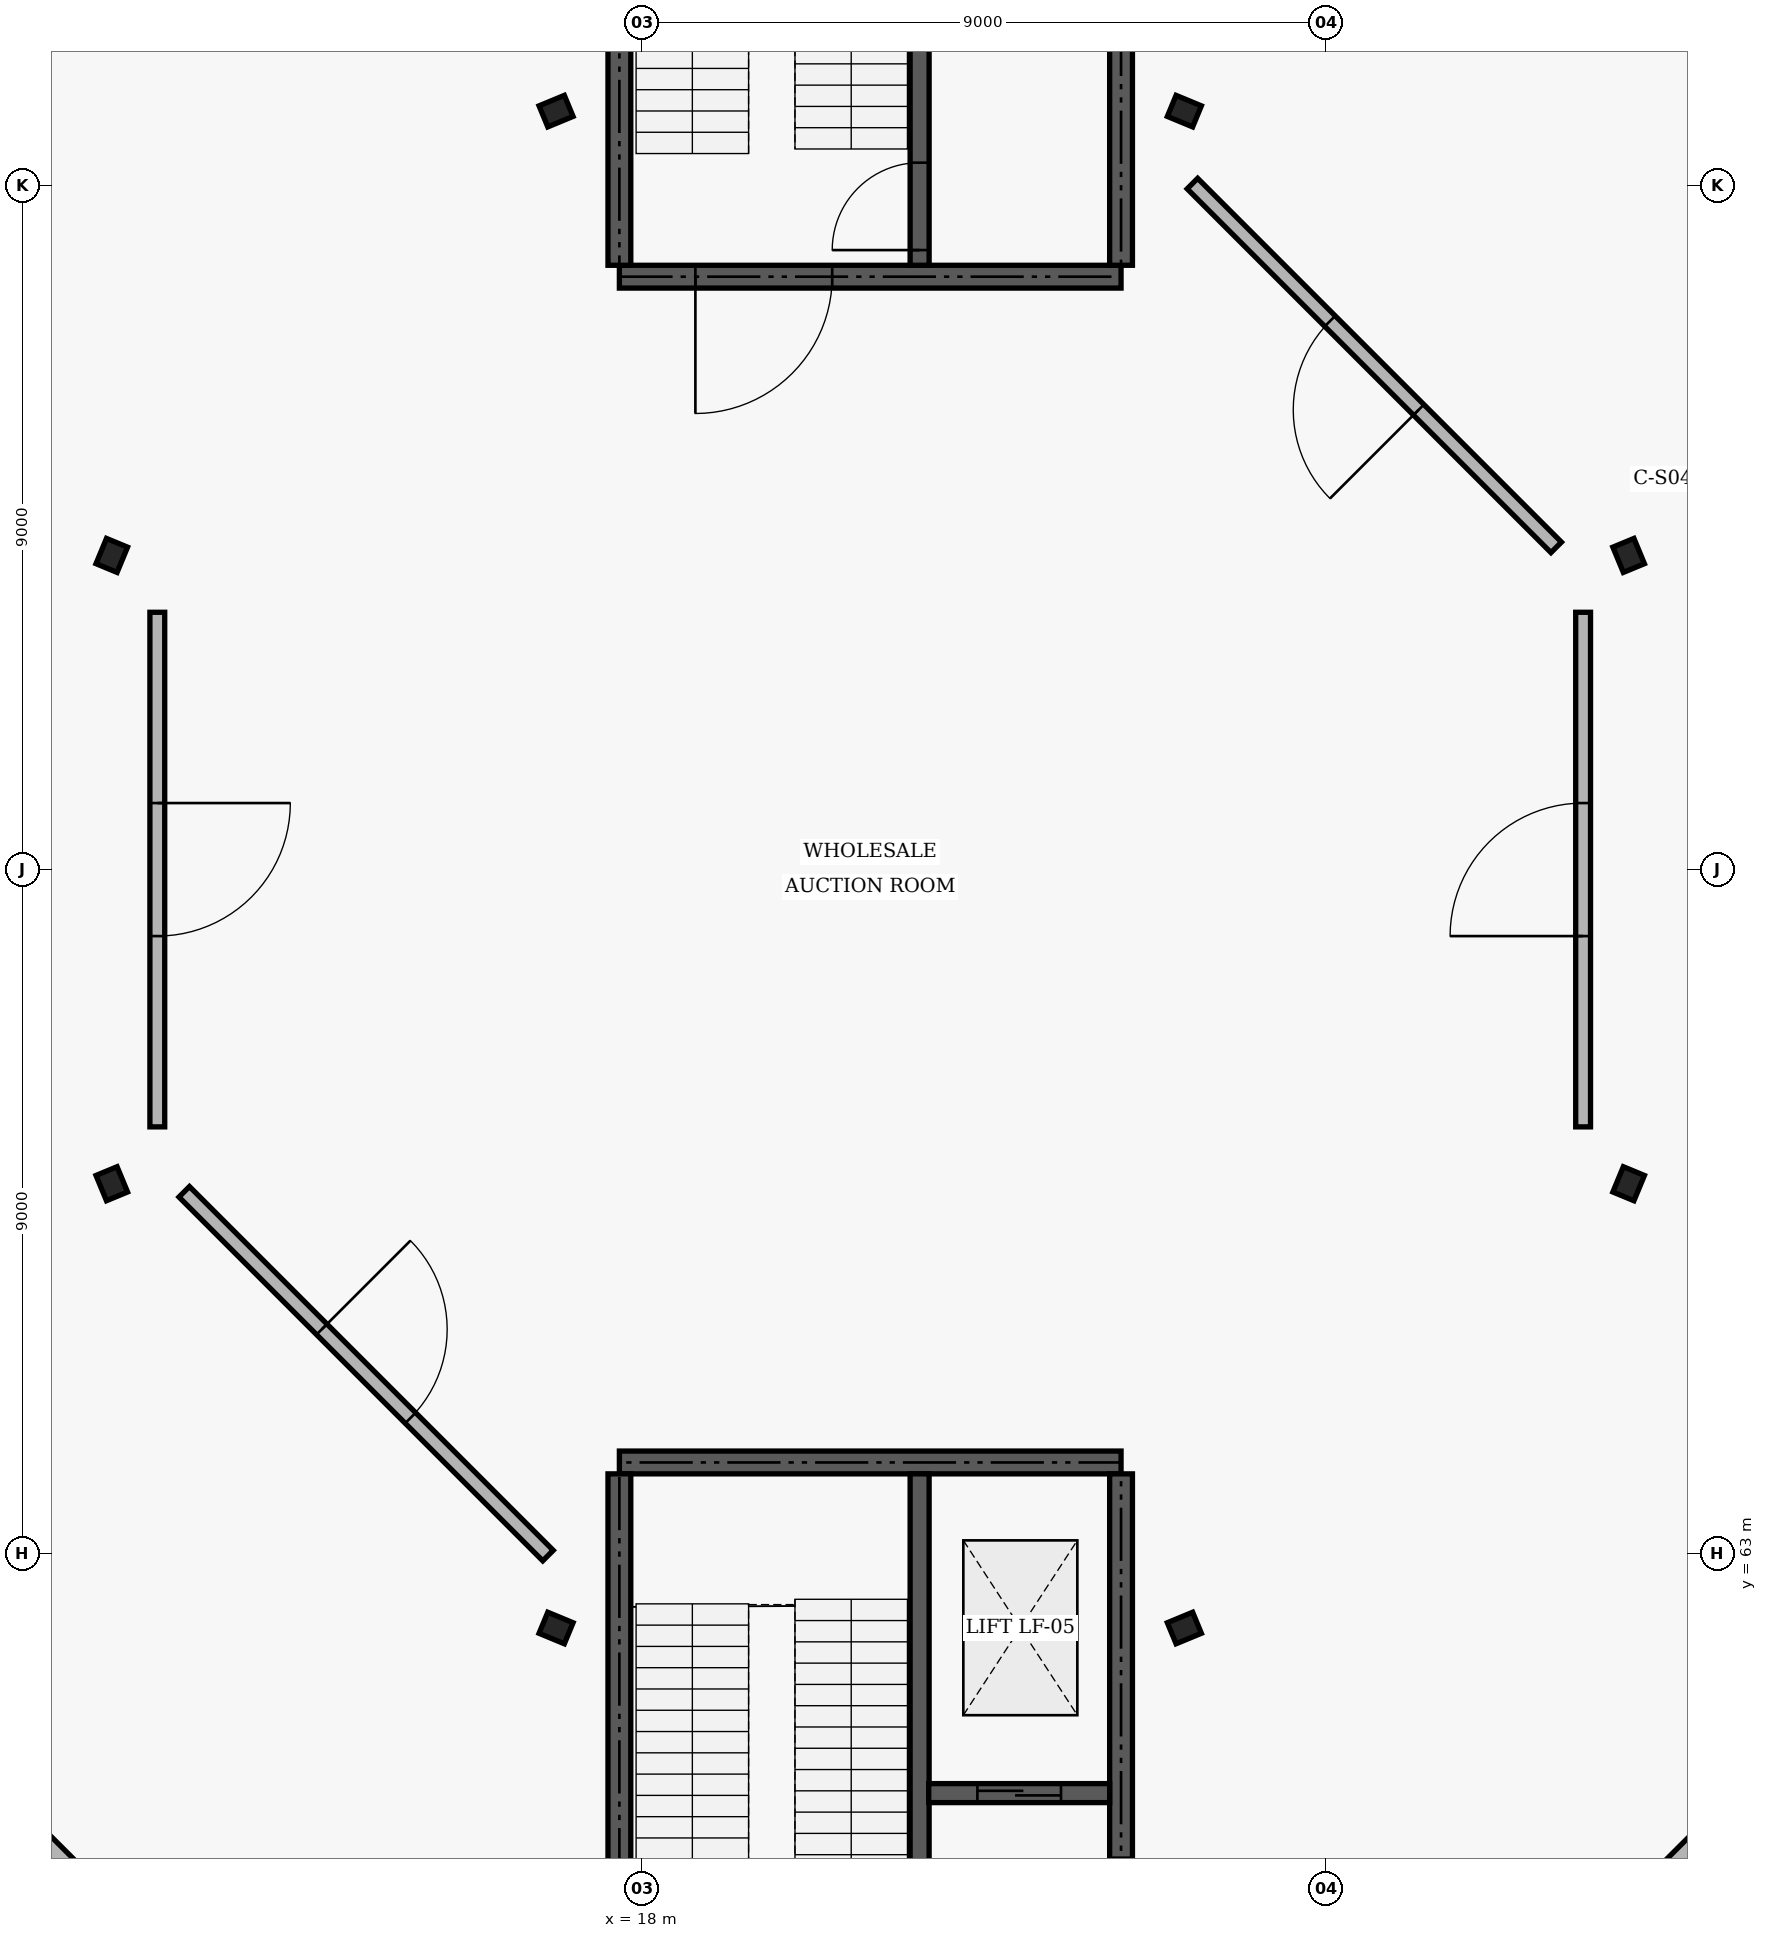
"""IFC4 building model, lengths in metres.
Left out: names, types, materials, properties, quantities, classifications, styles, units other than length and angle.
Written with IfcOpenShell. Run it as: python <this file> out.ifc"""

import sys

from ifc_helpers import new_model, si_unit, direction, frame, frame_2d, origin, origin_2d, place, context, subcontext, project, spatial, rectangle, i_section, extrude, element, fill, save


model = new_model("IFC4")
c1 = context("Model", 3, precision=1e-05, world=origin(), true_north=direction((0.0, 1.0)))
c2 = subcontext(c1, "Body", "Model", "MODEL_VIEW")
j1 = project(units=[si_unit("LENGTHUNIT", "METRE"), si_unit("PLANEANGLEUNIT", "RADIAN")], contexts=[c1])
p1 = place(None, origin())
s1 = spatial("IfcSite", under=j1, at=p1, CompositionType="ELEMENT")
p2 = place(p1, origin())
s2 = spatial("IfcBuilding", under=s1, at=p2, CompositionType="ELEMENT")
p3 = place(p2, origin())
s3 = spatial("IfcBuildingStorey", under=s2, at=p3, CompositionType="ELEMENT", Elevation=0.0)
for number, where, z_axis, x_axis in (
    (1, (30.978, 76.133, 0.0), (0.0, 0.0, 1.0), (0.924, 0.383, 0.0)),
    (2, (25.133, 81.978, 0.0), (0.0, 0.0, 1.0), (0.383, 0.924, 0.0)),
    (3, (16.867, 81.978, 0.0), (0.0, 0.0, 1.0), (-0.383, 0.924, 0.0)),
    (4, (11.022, 76.133, 0.0), (0.0, 0.0, 1.0), (-0.924, 0.383, 0.0)),
    (5, (11.022, 67.867, 0.0), (0.0, 0.0, 1.0), (-0.924, -0.383, 0.0)),
    (6, (16.867, 62.022, 0.0), (0.0, 0.0, 1.0), (-0.383, -0.924, 0.0)),
    (7, (25.133, 62.022, 0.0), (0.0, 0.0, 1.0), (0.383, -0.924, 0.0)),
    (8, (30.978, 67.867, 0.0), (0.0, 0.0, 1.0), (0.924, -0.383, 0.0)),
):
    element("IfcColumn", number, at=place(p3, frame(where, z_axis=z_axis, x_axis=x_axis)), inside=s3, PredefinedType="COLUMN", context=c2, shape_type="SweptSolid", body=[
        extrude(i_section(OverallWidth=0.3, OverallDepth=0.36, WebThickness=0.012, FlangeThickness=0.022, FilletRadius=0.027, at=origin_2d()), origin(), (0.0, 0.0, 1.0), 5.4),
    ])
p4 = place(p3, frame((37.716, 79.064, 0.0), z_axis=(0.0, 0.0, 1.0), x_axis=(-0.707106781187, 0.707106781187, 0.0)))
e9 = element("IfcWall", 9, at=p4, inside=s3, PredefinedType="SOLIDWALL", context=c2, shape_type="SweptSolid", body=[
    extrude(rectangle(XDim=13.65, YDim=0.4, at=frame_2d((6.825, 0.0))), origin(), (0.0, 0.0, 1.0), 4.35),
])
p5 = place(p4, frame((5.825, 0.0, 0.0)))
e10 = element("IfcOpeningElement", 10, at=p5, cuts=e9, PredefinedType="OPENING", context=c2, shape_type="SweptSolid", body=[
    extrude(rectangle(XDim=2.0, YDim=2.3, at=frame_2d((1.0, 1.15))), frame((0.0, 0.21, 0.0), z_axis=(0.0, -1.0, 0.0), x_axis=(1.0, 0.0, 0.0)), (0.0, 0.0, 1.0), 0.42),
])
p6 = place(p3, frame((13.936, 88.716, 0.0), z_axis=(0.0, 0.0, 1.0), x_axis=(-0.707106781187, -0.707106781187, 0.0)))
e11 = element("IfcWall", 11, at=p6, inside=s3, PredefinedType="SOLIDWALL", context=c2, shape_type="SweptSolid", body=[
    extrude(rectangle(XDim=13.65, YDim=0.4, at=frame_2d((6.825, 0.0))), origin(), (0.0, 0.0, 1.0), 4.35),
])
p7 = place(p6, frame((5.825, 0.0, 0.0)))
e12 = element("IfcOpeningElement", 12, at=p7, cuts=e11, PredefinedType="OPENING", context=c2, shape_type="SweptSolid", body=[
    extrude(rectangle(XDim=2.0, YDim=2.3, at=frame_2d((1.0, 1.15))), frame((0.0, 0.21, 0.0), z_axis=(0.0, -1.0, 0.0), x_axis=(1.0, 0.0, 0.0)), (0.0, 0.0, 1.0), 0.42),
])
p8 = place(p3, frame((4.284, 64.936, 0.0), z_axis=(0.0, 0.0, 1.0), x_axis=(0.707106781187, -0.707106781187, 0.0)))
e13 = element("IfcWall", 13, at=p8, inside=s3, PredefinedType="SOLIDWALL", context=c2, shape_type="SweptSolid", body=[
    extrude(rectangle(XDim=13.65, YDim=0.4, at=frame_2d((6.825, 0.0))), origin(), (0.0, 0.0, 1.0), 4.35),
])
p9 = place(p8, frame((5.825, 0.0, 0.0)))
e14 = element("IfcOpeningElement", 14, at=p9, cuts=e13, PredefinedType="OPENING", context=c2, shape_type="SweptSolid", body=[
    extrude(rectangle(XDim=2.0, YDim=2.3, at=frame_2d((1.0, 1.15))), frame((0.0, 0.21, 0.0), z_axis=(0.0, -1.0, 0.0), x_axis=(1.0, 0.0, 0.0)), (0.0, 0.0, 1.0), 0.42),
])
p10 = place(p3, frame((28.064, 55.284, 0.0), z_axis=(0.0, 0.0, 1.0), x_axis=(0.707106781187, 0.707106781187, 0.0)))
e15 = element("IfcWall", 15, at=p10, inside=s3, PredefinedType="SOLIDWALL", context=c2, shape_type="SweptSolid", body=[
    extrude(rectangle(XDim=13.65, YDim=0.4, at=frame_2d((6.825, 0.0))), origin(), (0.0, 0.0, 1.0), 4.35),
])
p11 = place(p10, frame((5.825, 0.0, 0.0)))
e16 = element("IfcOpeningElement", 16, at=p11, cuts=e15, PredefinedType="OPENING", context=c2, shape_type="SweptSolid", body=[
    extrude(rectangle(XDim=2.0, YDim=2.3, at=frame_2d((1.0, 1.15))), frame((0.0, 0.21, 0.0), z_axis=(0.0, -1.0, 0.0), x_axis=(1.0, 0.0, 0.0)), (0.0, 0.0, 1.0), 0.42),
])
p12 = place(p3, frame((17.7, 64.2, 0.0), z_axis=(0.0, 0.0, 1.0), x_axis=(1.0, 0.0, 0.0)))
e17 = element("IfcWall", 17, at=p12, inside=s3, PredefinedType="SHEAR", context=c2, shape_type="SweptSolid", body=[
    extrude(rectangle(XDim=6.6, YDim=0.3, at=frame_2d((3.3, 0.0))), origin(), (0.0, 0.0, 1.0), 5.4),
])
p13 = place(p3, frame((17.7, 56.95, 0.0), z_axis=(0.0, 0.0, 1.0), x_axis=(0.0, 1.0, 0.0)))
e18 = element("IfcWall", 18, at=p13, inside=s3, PredefinedType="SHEAR", context=c2, shape_type="SweptSolid", body=[
    extrude(rectangle(XDim=7.1, YDim=0.3, at=frame_2d((3.55, 0.0))), origin(), (0.0, 0.0, 1.0), 5.4),
])
p14 = place(p3, frame((24.3, 56.95, 0.0), z_axis=(0.0, 0.0, 1.0), x_axis=(0.0, 1.0, 0.0)))
e19 = element("IfcWall", 19, at=p14, inside=s3, PredefinedType="SHEAR", context=c2, shape_type="SweptSolid", body=[
    extrude(rectangle(XDim=7.1, YDim=0.3, at=frame_2d((3.55, 0.0))), origin(), (0.0, 0.0, 1.0), 5.4),
])
p15 = place(p14, frame((0.75, 0.0, 0.0)))
e20 = element("IfcOpeningElement", 20, at=p15, cuts=e19, PredefinedType="OPENING", context=c2, shape_type="SweptSolid", body=[
    extrude(rectangle(XDim=1.3, YDim=2.15, at=frame_2d((0.65, 1.075))), frame((0.0, 0.16, 0.0), z_axis=(0.0, -1.0, 0.0), x_axis=(1.0, 0.0, 0.0)), (0.0, 0.0, 1.0), 0.32),
])
p16 = place(p3, frame((21.65, 56.95, 0.0), z_axis=(0.0, 0.0, 1.0), x_axis=(0.0, 1.0, 0.0)))
e21 = element("IfcWall", 21, at=p16, inside=s3, PredefinedType="SHEAR", context=c2, shape_type="SweptSolid", body=[
    extrude(rectangle(XDim=7.1, YDim=0.25, at=frame_2d((3.55, 0.0))), origin(), (0.0, 0.0, 1.0), 5.4),
])
p17 = place(p16, frame((0.2, 0.0, 0.0)))
e22 = element("IfcOpeningElement", 22, at=p17, cuts=e21, PredefinedType="OPENING", context=c2, shape_type="SweptSolid", body=[
    extrude(rectangle(XDim=1.15, YDim=2.15, at=frame_2d((0.575, 1.075))), frame((0.0, 0.135, 0.0), z_axis=(0.0, -1.0, 0.0), x_axis=(1.0, 0.0, 0.0)), (0.0, 0.0, 1.0), 0.27),
])
p18 = place(p3, frame((21.77, 59.85, 0.0), z_axis=(0.0, 0.0, 1.0), x_axis=(1.0, 0.0, 0.0)))
e23 = element("IfcWall", 23, at=p18, inside=s3, PredefinedType="SHEAR", context=c2, shape_type="SweptSolid", body=[
    extrude(rectangle(XDim=2.38, YDim=0.25, at=frame_2d((1.19, 0.0))), origin(), (0.0, 0.0, 1.0), 5.4),
])
p19 = place(p18, frame((0.64, 0.0, 0.0)))
e24 = element("IfcOpeningElement", 24, at=p19, cuts=e23, PredefinedType="OPENING", context=c2, shape_type="SweptSolid", body=[
    extrude(rectangle(XDim=1.1, YDim=2.15, at=frame_2d((0.55, 1.075))), frame((0.0, 0.135, 0.0), z_axis=(0.0, -1.0, 0.0), x_axis=(1.0, 0.0, 0.0)), (0.0, 0.0, 1.0), 0.27),
])
p20 = place(p3, frame((17.7, 79.8, 0.0), z_axis=(0.0, 0.0, 1.0), x_axis=(1.0, 0.0, 0.0)))
e25 = element("IfcWall", 25, at=p20, inside=s3, PredefinedType="SHEAR", context=c2, shape_type="SweptSolid", body=[
    extrude(rectangle(XDim=6.6, YDim=0.3, at=frame_2d((3.3, 0.0))), origin(), (0.0, 0.0, 1.0), 5.4),
])
p21 = place(p20, frame((1.0, 0.0, 0.0)))
e26 = element("IfcOpeningElement", 26, at=p21, cuts=e25, PredefinedType="OPENING", context=c2, shape_type="SweptSolid", body=[
    extrude(rectangle(XDim=1.8, YDim=2.15, at=frame_2d((0.9, 1.075))), frame((0.0, 0.16, 0.0), z_axis=(0.0, -1.0, 0.0), x_axis=(1.0, 0.0, 0.0)), (0.0, 0.0, 1.0), 0.32),
])
p22 = place(p3, frame((17.7, 79.95, 0.0), z_axis=(0.0, 0.0, 1.0), x_axis=(0.0, 1.0, 0.0)))
e27 = element("IfcWall", 27, at=p22, inside=s3, PredefinedType="SHEAR", context=c2, shape_type="SweptSolid", body=[
    extrude(rectangle(XDim=7.1, YDim=0.3, at=frame_2d((3.55, 0.0))), origin(), (0.0, 0.0, 1.0), 5.4),
])
p23 = place(p3, frame((24.3, 79.95, 0.0), z_axis=(0.0, 0.0, 1.0), x_axis=(0.0, 1.0, 0.0)))
e28 = element("IfcWall", 28, at=p23, inside=s3, PredefinedType="SHEAR", context=c2, shape_type="SweptSolid", body=[
    extrude(rectangle(XDim=7.1, YDim=0.3, at=frame_2d((3.55, 0.0))), origin(), (0.0, 0.0, 1.0), 5.4),
])
p24 = place(p23, frame((4.2, 0.0, 0.0)))
e29 = element("IfcOpeningElement", 29, at=p24, cuts=e28, PredefinedType="OPENING", context=c2, shape_type="SweptSolid", body=[
    extrude(rectangle(XDim=1.3, YDim=2.15, at=frame_2d((0.65, 1.075))), frame((0.0, 0.16, 0.0), z_axis=(0.0, -1.0, 0.0), x_axis=(1.0, 0.0, 0.0)), (0.0, 0.0, 1.0), 0.32),
])
p25 = place(p3, frame((21.65, 79.95, 0.0), z_axis=(0.0, 0.0, 1.0), x_axis=(0.0, 1.0, 0.0)))
e30 = element("IfcWall", 30, at=p25, inside=s3, PredefinedType="SHEAR", context=c2, shape_type="SweptSolid", body=[
    extrude(rectangle(XDim=7.1, YDim=0.25, at=frame_2d((3.55, 0.0))), origin(), (0.0, 0.0, 1.0), 5.4),
])
p26 = place(p25, frame((0.2, 0.0, 0.0)))
e31 = element("IfcOpeningElement", 31, at=p26, cuts=e30, PredefinedType="OPENING", context=c2, shape_type="SweptSolid", body=[
    extrude(rectangle(XDim=1.15, YDim=2.15, at=frame_2d((0.575, 1.075))), frame((0.0, 0.135, 0.0), z_axis=(0.0, -1.0, 0.0), x_axis=(1.0, 0.0, 0.0)), (0.0, 0.0, 1.0), 0.27),
])
p27 = place(p3, frame((30.025, 76.239, 0.0), z_axis=(0.0, 0.0, 1.0), x_axis=(-0.707106781187, 0.707106781187, 0.0)))
e32 = element("IfcWall", 32, at=p27, inside=s3, PredefinedType="PARTITIONING", context=c2, shape_type="SweptSolid", body=[
    extrude(rectangle(XDim=6.768, YDim=0.195, at=frame_2d((3.384, 0.0))), origin(), (0.0, 0.0, 1.0), 4.3),
])
p28 = place(p27, frame((2.559, 0.0, 0.0)))
e33 = element("IfcOpeningElement", 33, at=p28, cuts=e32, PredefinedType="OPENING", context=c2, shape_type="SweptSolid", body=[
    extrude(rectangle(XDim=1.65, YDim=2.25, at=frame_2d((0.825, 1.125))), frame((0.0, 0.107, 0.0), z_axis=(0.0, -1.0, 0.0), x_axis=(1.0, 0.0, 0.0)), (0.0, 0.0, 1.0), 0.215),
])
p29 = place(p3, frame((11.621, 75.385, 0.0), z_axis=(0.0, 0.0, 1.0), x_axis=(0.0, -1.0, 0.0)))
e34 = element("IfcWall", 34, at=p29, inside=s3, PredefinedType="PARTITIONING", context=c2, shape_type="SweptSolid", body=[
    extrude(rectangle(XDim=6.77, YDim=0.195, at=frame_2d((3.385, 0.0))), origin(), (0.0, 0.0, 1.0), 4.3),
])
p30 = place(p29, frame((2.51, 0.0, 0.0)))
e35 = element("IfcOpeningElement", 35, at=p30, cuts=e34, PredefinedType="OPENING", context=c2, shape_type="SweptSolid", body=[
    extrude(rectangle(XDim=1.75, YDim=2.3, at=frame_2d((0.875, 1.15))), frame((0.0, 0.107, 0.0), z_axis=(0.0, -1.0, 0.0), x_axis=(1.0, 0.0, 0.0)), (0.0, 0.0, 1.0), 0.215),
])
p31 = place(p3, frame((11.975, 67.761, 0.0), z_axis=(0.0, 0.0, 1.0), x_axis=(0.707106781187, -0.707106781187, 0.0)))
e36 = element("IfcWall", 36, at=p31, inside=s3, PredefinedType="PARTITIONING", context=c2, shape_type="SweptSolid", body=[
    extrude(rectangle(XDim=6.768, YDim=0.195, at=frame_2d((3.384, 0.0))), origin(), (0.0, 0.0, 1.0), 4.3),
])
p32 = place(p31, frame((2.559, 0.0, 0.0)))
e37 = element("IfcOpeningElement", 37, at=p32, cuts=e36, PredefinedType="OPENING", context=c2, shape_type="SweptSolid", body=[
    extrude(rectangle(XDim=1.65, YDim=2.25, at=frame_2d((0.825, 1.125))), frame((0.0, 0.107, 0.0), z_axis=(0.0, -1.0, 0.0), x_axis=(1.0, 0.0, 0.0)), (0.0, 0.0, 1.0), 0.215),
])
p33 = place(p3, frame((30.379, 68.615, 0.0), z_axis=(0.0, 0.0, 1.0), x_axis=(0.0, 1.0, 0.0)))
e38 = element("IfcWall", 38, at=p33, inside=s3, PredefinedType="PARTITIONING", context=c2, shape_type="SweptSolid", body=[
    extrude(rectangle(XDim=6.77, YDim=0.195, at=frame_2d((3.385, 0.0))), origin(), (0.0, 0.0, 1.0), 4.3),
])
p34 = place(p33, frame((2.51, 0.0, 0.0)))
e39 = element("IfcOpeningElement", 39, at=p34, cuts=e38, PredefinedType="OPENING", context=c2, shape_type="SweptSolid", body=[
    extrude(rectangle(XDim=1.75, YDim=2.3, at=frame_2d((0.875, 1.15))), frame((0.0, 0.107, 0.0), z_axis=(0.0, -1.0, 0.0), x_axis=(1.0, 0.0, 0.0)), (0.0, 0.0, 1.0), 0.215),
])
p35 = place(p15, frame((1.3, 0.0, 0.0), z_axis=(0.0, 0.0, 1.0), x_axis=(-1.0, 0.0, 0.0)))
e40 = element("IfcDoor", 40, at=p35, inside=s3, OperationType="DOUBLE_DOOR_SINGLE_SWING", PredefinedType="DOOR", context=c2, shape_type="SweptSolid", body=[
    extrude(rectangle(XDim=1.3, YDim=2.15, at=frame_2d((0.65, 1.075))), frame((0.0, 0.025, 0.0), z_axis=(0.0, -1.0, 0.0), x_axis=(1.0, 0.0, 0.0)), (0.0, 0.0, 1.0), 0.05),
])
fill(e20, e40)
p36 = place(p19, origin())
e41 = element("IfcDoor", 41, at=p36, inside=s3, OperationType="SLIDING_TO_LEFT", PredefinedType="DOOR", context=c2, shape_type="SweptSolid", body=[
    extrude(rectangle(XDim=1.1, YDim=2.15, at=frame_2d((0.55, 1.075))), frame((0.0, 0.025, 0.0), z_axis=(0.0, -1.0, 0.0), x_axis=(1.0, 0.0, 0.0)), (0.0, 0.0, 1.0), 0.05),
])
fill(e24, e41)
p37 = place(p26, origin())
e42 = element("IfcDoor", 42, at=p37, inside=s3, OperationType="SINGLE_SWING_LEFT", PredefinedType="DOOR", context=c2, shape_type="SweptSolid", body=[
    extrude(rectangle(XDim=1.15, YDim=2.15, at=frame_2d((0.575, 1.075))), frame((0.0, 0.025, 0.0), z_axis=(0.0, -1.0, 0.0), x_axis=(1.0, 0.0, 0.0)), (0.0, 0.0, 1.0), 0.05),
])
fill(e31, e42)
p38 = place(p21, frame((1.8, 0.0, 0.0), z_axis=(0.0, 0.0, 1.0), x_axis=(-1.0, 0.0, 0.0)))
e43 = element("IfcDoor", 43, at=p38, inside=s3, OperationType="DOUBLE_DOOR_SINGLE_SWING", PredefinedType="DOOR", context=c2, shape_type="SweptSolid", body=[
    extrude(rectangle(XDim=1.8, YDim=2.15, at=frame_2d((0.9, 1.075))), frame((0.0, 0.025, 0.0), z_axis=(0.0, -1.0, 0.0), x_axis=(1.0, 0.0, 0.0)), (0.0, 0.0, 1.0), 0.05),
])
fill(e26, e43)
p39 = place(p28, origin())
e44 = element("IfcDoor", 44, at=p39, inside=s3, OperationType="DOUBLE_DOOR_SINGLE_SWING", PredefinedType="DOOR", context=c2, shape_type="SweptSolid", body=[
    extrude(rectangle(XDim=1.65, YDim=2.25, at=frame_2d((0.825, 1.125))), frame((0.0, 0.025, 0.0), z_axis=(0.0, -1.0, 0.0), x_axis=(1.0, 0.0, 0.0)), (0.0, 0.0, 1.0), 0.05),
])
fill(e33, e44)
p40 = place(p30, origin())
e45 = element("IfcDoor", 45, at=p40, inside=s3, OperationType="DOUBLE_DOOR_SINGLE_SWING", PredefinedType="DOOR", context=c2, shape_type="SweptSolid", body=[
    extrude(rectangle(XDim=1.75, YDim=2.3, at=frame_2d((0.875, 1.15))), frame((0.0, 0.025, 0.0), z_axis=(0.0, -1.0, 0.0), x_axis=(1.0, 0.0, 0.0)), (0.0, 0.0, 1.0), 0.05),
])
fill(e35, e45)
p41 = place(p32, origin())
e46 = element("IfcDoor", 46, at=p41, inside=s3, OperationType="DOUBLE_DOOR_SINGLE_SWING", PredefinedType="DOOR", context=c2, shape_type="SweptSolid", body=[
    extrude(rectangle(XDim=1.65, YDim=2.25, at=frame_2d((0.825, 1.125))), frame((0.0, 0.025, 0.0), z_axis=(0.0, -1.0, 0.0), x_axis=(1.0, 0.0, 0.0)), (0.0, 0.0, 1.0), 0.05),
])
fill(e37, e46)
p42 = place(p34, origin())
e47 = element("IfcDoor", 47, at=p42, inside=s3, OperationType="DOUBLE_DOOR_SINGLE_SWING", PredefinedType="DOOR", context=c2, shape_type="SweptSolid", body=[
    extrude(rectangle(XDim=1.75, YDim=2.3, at=frame_2d((0.875, 1.15))), frame((0.0, 0.025, 0.0), z_axis=(0.0, -1.0, 0.0), x_axis=(1.0, 0.0, 0.0)), (0.0, 0.0, 1.0), 0.05),
])
fill(e39, e47)
save(model, sys.argv[1])
